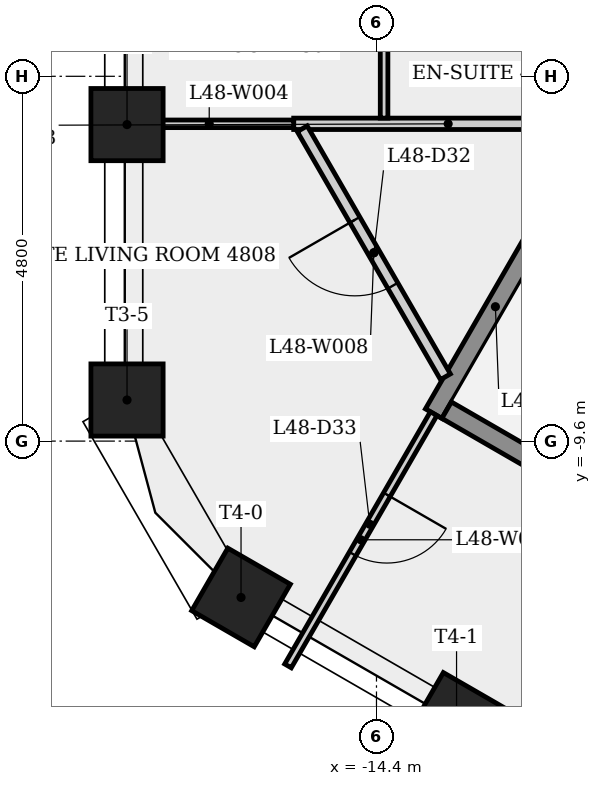
"""IFC4 building model, lengths in metres.
Left out: names, types, materials, properties, quantities, classifications, styles, units other than length and angle.
Written with IfcOpenShell. Run it as: python <this file> out.ifc"""

import sys

from ifc_helpers import new_model, si_unit, direction, frame, frame_2d, origin, origin_2d, place, context, subcontext, project, spatial, rectangle, extrude, element, fill, save


model = new_model("IFC4")
c1 = context("Model", 3, precision=1e-05, world=origin(), true_north=direction((0.0, 1.0)))
c2 = subcontext(c1, "Body", "Model", "MODEL_VIEW")
j1 = project(units=[si_unit("LENGTHUNIT", "METRE"), si_unit("PLANEANGLEUNIT", "RADIAN")], contexts=[c1])
p1 = place(None, origin())
s1 = spatial("IfcSite", under=j1, at=p1, CompositionType="ELEMENT")
p2 = place(p1, origin())
s2 = spatial("IfcBuilding", under=s1, at=p2, CompositionType="ELEMENT")
p3 = place(p2, frame((0.0, 0.0, 179.9)))
s3 = spatial("IfcBuildingStorey", under=s2, at=p3, CompositionType="ELEMENT", Elevation=179.9)
for number, where, z_axis, x_axis in (
    (1, (-17.682, -5.436, 0.0), (0.0, 0.0, 1.0), (-1.0, 0.0, 0.0)),
    (2, (-17.682, -9.059, 0.0), (0.0, 0.0, 1.0), (-1.0, 0.0, 0.0)),
    (3, (-16.182, -11.657, 0.0), (0.0, 0.0, 1.0), (-0.5, -0.866, 0.0)),
    (4, (-13.346, -13.294, 0.0), (0.0, 0.0, 1.0), (-0.5, -0.866, 0.0)),
):
    element("IfcColumn", number, at=place(p3, frame(where, z_axis=z_axis, x_axis=x_axis)), inside=s3, PredefinedType="COLUMN", context=c2, shape_type="SweptSolid", body=[
        extrude(rectangle(XDim=0.95, YDim=0.95, at=origin_2d()), origin(), (0.0, 0.0, 1.0), 3.4),
    ])
p4 = place(p3, frame((-15.489, -5.425, 0.0), z_axis=(0.0, 0.0, 1.0), x_axis=(1.0, 0.0, 0.0)))
e5 = element("IfcWall", 5, at=p4, inside=s3, PredefinedType="PARTITIONING", context=c2, shape_type="SweptSolid", body=[
    extrude(rectangle(XDim=4.064, YDim=0.15, at=frame_2d((2.032, 0.0))), origin(), (0.0, 0.0, 1.0), 3.05),
])
p5 = place(p3, frame((-15.489, -5.425, 0.0), z_axis=(0.0, 0.0, 1.0), x_axis=(-1.0, 0.0, 0.0)))
e6 = element("IfcWall", 6, at=p5, inside=s3, PredefinedType="PARTITIONING", context=c2, shape_type="SweptSolid", body=[
    extrude(rectangle(XDim=2.223, YDim=0.1, at=frame_2d((1.111, 0.0))), origin(), (0.0, 0.0, 1.0), 3.05),
])
p6 = place(p3, frame((-14.3, -3.458, 0.0), z_axis=(0.0, 0.0, 1.0), x_axis=(0.0, -1.0, 0.0)))
e7 = element("IfcWall", 7, at=p6, inside=s3, PredefinedType="PARTITIONING", context=c2, shape_type="SweptSolid", body=[
    extrude(rectangle(XDim=1.892, YDim=0.1, at=frame_2d((0.946, 0.0))), origin(), (0.0, 0.0, 1.0), 3.05),
])
p7 = place(p3, frame((-13.648, -9.239, 0.0), z_axis=(0.0, 0.0, 1.0), x_axis=(0.500017246033, 0.866015446554, 0.0)))
e8 = element("IfcWall", 8, at=p7, inside=s3, PredefinedType="SHEAR", context=c2, shape_type="SweptSolid", body=[
    extrude(rectangle(XDim=3.25, YDim=0.25, at=frame_2d((1.625, 0.0))), origin(), (0.0, 0.0, 1.0), 3.05),
])
p8 = place(p3, frame((-13.648, -9.239, 0.0), z_axis=(0.0, 0.0, 1.0), x_axis=(-0.500044099915, -0.86599994119, 0.0)))
e9 = element("IfcWall", 9, at=p8, inside=s3, PredefinedType="PARTITIONING", context=c2, shape_type="SweptSolid", body=[
    extrude(rectangle(XDim=3.833, YDim=0.1, at=frame_2d((1.917, 0.0))), origin(), (0.0, 0.0, 1.0), 3.05),
])
p9 = place(p8, frame((1.231, 0.0, 0.0)))
e10 = element("IfcOpeningElement", 10, at=p9, cuts=e9, PredefinedType="OPENING", context=c2, shape_type="SweptSolid", body=[
    extrude(rectangle(XDim=0.9, YDim=2.1, at=frame_2d((0.45, 1.05))), frame((0.0, 0.06, 0.0), z_axis=(0.0, -1.0, 0.0), x_axis=(1.0, 0.0, 0.0)), (0.0, 0.0, 1.0), 0.12),
])
p10 = place(p3, frame((-13.493, -8.753, 0.0), z_axis=(0.0, 0.0, 1.0), x_axis=(-0.500006623535, 0.866021579651, 0.0)))
e11 = element("IfcWall", 11, at=p10, inside=s3, PredefinedType="PARTITIONING", context=c2, shape_type="SweptSolid", body=[
    extrude(rectangle(XDim=3.768, YDim=0.15, at=frame_2d((1.884, 0.0))), origin(), (0.0, 0.0, 1.0), 3.05),
])
p11 = place(p10, frame((1.384, 0.0, 0.0)))
e12 = element("IfcOpeningElement", 12, at=p11, cuts=e11, PredefinedType="OPENING", context=c2, shape_type="SweptSolid", body=[
    extrude(rectangle(XDim=1.0, YDim=2.1, at=frame_2d((0.5, 1.05))), frame((0.0, 0.085, 0.0), z_axis=(0.0, -1.0, 0.0), x_axis=(1.0, 0.0, 0.0)), (0.0, 0.0, 1.0), 0.17),
])
p12 = place(p3, frame((-7.935, -12.393, 0.0), z_axis=(0.0, 0.0, 1.0), x_axis=(-0.866025499775, 0.499999833739, 0.0)))
e13 = element("IfcWall", 13, at=p12, inside=s3, PredefinedType="SHEAR", context=c2, shape_type="SweptSolid", body=[
    extrude(rectangle(XDim=6.4, YDim=0.25, at=frame_2d((3.2, 0.0))), origin(), (0.0, 0.0, 1.0), 3.05),
])
p13 = place(p11, origin())
e14 = element("IfcDoor", 14, at=p13, inside=s3, OperationType="SINGLE_SWING_RIGHT", PredefinedType="DOOR", context=c2, shape_type="SweptSolid", body=[
    extrude(rectangle(XDim=1.0, YDim=2.1, at=frame_2d((0.5, 1.05))), frame((0.0, 0.025, 0.0), z_axis=(0.0, -1.0, 0.0), x_axis=(1.0, 0.0, 0.0)), (0.0, 0.0, 1.0), 0.05),
])
fill(e12, e14)
p14 = place(p9, origin())
e15 = element("IfcDoor", 15, at=p14, inside=s3, OperationType="SINGLE_SWING_LEFT", PredefinedType="DOOR", context=c2, shape_type="SweptSolid", body=[
    extrude(rectangle(XDim=0.9, YDim=2.1, at=frame_2d((0.45, 1.05))), frame((0.0, 0.025, 0.0), z_axis=(0.0, -1.0, 0.0), x_axis=(1.0, 0.0, 0.0)), (0.0, 0.0, 1.0), 0.05),
])
fill(e10, e15)
save(model, sys.argv[1])
